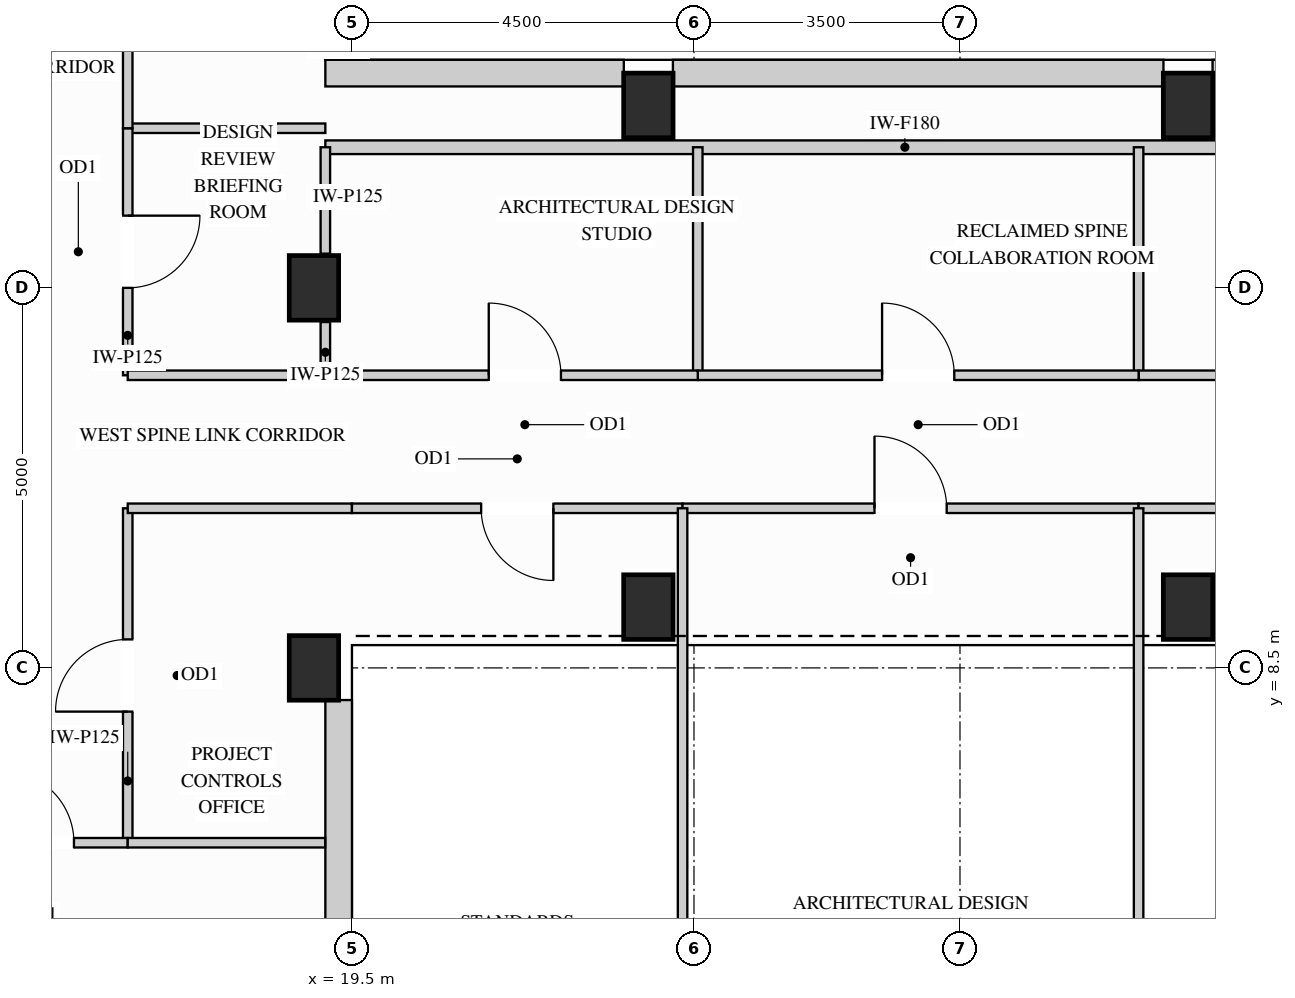
"""IFC4 building model, lengths in metres.
Left out: names, types, materials, properties, quantities, classifications, styles, units other than length and angle.
Written with IfcOpenShell. Run it as: python <this file> out.ifc"""

import sys

from ifc_helpers import new_model, si_unit, direction, frame, frame_2d, origin, origin_2d, place, context, subcontext, project, spatial, rectangle, extrude, source, transform, mapped, element, fill, save


model = new_model("IFC4")
c1 = context("Model", 3, precision=1e-05, world=origin(), true_north=direction((0.0, 1.0)))
c2 = subcontext(c1, "Body", "Model", "MODEL_VIEW")
j1 = project(units=[si_unit("LENGTHUNIT", "METRE"), si_unit("PLANEANGLEUNIT", "RADIAN")], contexts=[c1])
p1 = place(None, origin())
s1 = spatial("IfcSite", under=j1, at=p1, CompositionType="ELEMENT")
p2 = place(p1, origin())
s2 = spatial("IfcBuilding", under=s1, at=p2, CompositionType="ELEMENT")
p3 = place(p2, frame((0.0, 0.0, 241.2)))
s3 = spatial("IfcBuildingStorey", under=s2, at=p3, CompositionType="ELEMENT", Elevation=241.2)
m1 = source(origin(), c2, "Body", "SweptSolid", [
    extrude(rectangle(XDim=0.65, YDim=0.85, at=origin_2d()), origin(), (0.0, 0.0, 1.0), 3.4),
])
for number, where, z_axis, x_axis in (
    (1, (19.0, 13.5, 0.0), (0.0, 0.0, 1.0), (1.0, 0.0, 0.0)),
    (2, (19.0, 8.5, 0.0), (0.0, 0.0, 1.0), (1.0, 0.0, 0.0)),
    (3, (23.4, 15.9, 0.0), (0.0, 0.0, 1.0), (1.0, 0.0, 0.0)),
    (4, (23.4, 9.3, 0.0), (0.0, 0.0, 1.0), (1.0, 0.0, 0.0)),
    (5, (30.5, 15.9, 0.0), (0.0, 0.0, 1.0), (1.0, 0.0, 0.0)),
    (6, (30.5, 9.3, 0.0), (0.0, 0.0, 1.0), (1.0, 0.0, 0.0)),
):
    element("IfcColumn", number, at=place(p3, frame(where, z_axis=z_axis, x_axis=x_axis)), inside=s3, PredefinedType="COLUMN", context=c2, shape_type="MappedRepresentation", body=[
        mapped(m1, transform((0.0, 0.0, 0.0), x_axis=(1.0, 0.0, 0.0), y_axis=(0.0, 1.0, 0.0), z_axis=(0.0, 0.0, 1.0))),
    ])
m2 = source(origin(), c2, "Body", "SweptSolid", [
    extrude(rectangle(XDim=1.079, YDim=0.35, at=frame_2d((0.54, 0.0))), origin(), (0.0, 0.0, 1.0), 2.619),
])
p4 = place(p3, frame((19.325, 16.498, 0.0), z_axis=(0.0, 0.0, 1.0), x_axis=(0.0, 1.0, 0.0)))
e7 = element("IfcWall", 7, at=p4, inside=s3, PredefinedType="SOLIDWALL", context=c2, shape_type="MappedRepresentation", body=[
    mapped(m2, transform((0.0, 0.0, 0.0), x_axis=(1.0, 0.0, 0.0), y_axis=(0.0, 1.0, 0.0), z_axis=(0.0, 0.0, 1.0))),
])
m3 = source(origin(), c2, "Body", "SweptSolid", [
    extrude(rectangle(XDim=4.154, YDim=0.35, at=frame_2d((2.077, 0.0))), origin(), (0.0, 0.0, 1.0), 2.619),
])
p5 = place(p3, frame((19.325, 3.923, 0.0), z_axis=(0.0, 0.0, 1.0), x_axis=(0.0, 1.0, 0.0)))
e8 = element("IfcWall", 8, at=p5, inside=s3, PredefinedType="SOLIDWALL", context=c2, shape_type="MappedRepresentation", body=[
    mapped(m3, transform((0.0, 0.0, 0.0), x_axis=(1.0, 0.0, 0.0), y_axis=(0.0, 1.0, 0.0), z_axis=(0.0, 0.0, 1.0))),
])
m4 = source(origin(), c2, "Body", "SweptSolid", [
    extrude(rectangle(XDim=3.927, YDim=0.35, at=frame_2d((1.963, 0.0))), origin(), (0.0, 0.0, 1.0), 3.385),
])
p6 = place(p3, frame((34.75, 16.325, 0.0), z_axis=(0.0, 0.0, 1.0), x_axis=(-1.0, 0.0, 0.0)))
e9 = element("IfcWall", 9, at=p6, inside=s3, PredefinedType="SOLIDWALL", context=c2, shape_type="MappedRepresentation", body=[
    mapped(m4, transform((0.0, 0.0, 0.0), x_axis=(1.0, 0.0, 0.0), y_axis=(0.0, 1.0, 0.0), z_axis=(0.0, 0.0, 1.0))),
])
m5 = source(origin(), c2, "Body", "SweptSolid", [
    extrude(rectangle(XDim=6.454, YDim=0.35, at=frame_2d((3.227, 0.0))), origin(), (0.0, 0.0, 1.0), 3.385),
])
p7 = place(p3, frame((30.177, 16.325, 0.0), z_axis=(0.0, 0.0, 1.0), x_axis=(-1.0, 0.0, 0.0)))
e10 = element("IfcWall", 10, at=p7, inside=s3, PredefinedType="SOLIDWALL", context=c2, shape_type="MappedRepresentation", body=[
    mapped(m5, transform((0.0, 0.0, 0.0), x_axis=(1.0, 0.0, 0.0), y_axis=(0.0, 1.0, 0.0), z_axis=(0.0, 0.0, 1.0))),
])
p8 = place(p3, frame((23.077, 16.325, 0.0), z_axis=(0.0, 0.0, 1.0), x_axis=(-1.0, 0.0, 0.0)))
e11 = element("IfcWall", 11, at=p8, inside=s3, PredefinedType="SOLIDWALL", context=c2, shape_type="MappedRepresentation", body=[
    mapped(m4, transform((0.0, 0.0, 0.0), x_axis=(1.0, 0.0, 0.0), y_axis=(0.0, 1.0, 0.0), z_axis=(0.0, 0.0, 1.0))),
])
m6 = source(origin(), c2, "Body", "SweptSolid", [
    extrude(rectangle(XDim=15.25, YDim=0.18, at=frame_2d((7.625, 0.0))), origin(), (0.0, 0.0, 1.0), 3.385),
])
p9 = place(p3, frame((19.15, 15.35, 0.0), z_axis=(0.0, 0.0, 1.0), x_axis=(1.0, 0.0, 0.0)))
e12 = element("IfcWall", 12, at=p9, inside=s3, PredefinedType="PARTITIONING", context=c2, shape_type="MappedRepresentation", body=[
    mapped(m6, transform((0.0, 0.0, 0.0), x_axis=(1.0, 0.0, 0.0), y_axis=(0.0, 1.0, 0.0), z_axis=(0.0, 0.0, 1.0))),
])
m7 = source(origin(), c2, "Body", "SweptSolid", [
    extrude(rectangle(XDim=2.6, YDim=0.125, at=frame_2d((1.3, 0.0))), origin(), (0.0, 0.0, 1.0), 3.385),
])
p10 = place(p3, frame((16.55, 15.6, 0.0), z_axis=(0.0, 0.0, 1.0), x_axis=(1.0, 0.0, 0.0)))
e13 = element("IfcWall", 13, at=p10, inside=s3, PredefinedType="PARTITIONING", context=c2, shape_type="MappedRepresentation", body=[
    mapped(m7, transform((0.0, 0.0, 0.0), x_axis=(1.0, 0.0, 0.0), y_axis=(0.0, 1.0, 0.0), z_axis=(0.0, 0.0, 1.0))),
])
m8 = source(origin(), c2, "Body", "SweptSolid", [
    extrude(rectangle(XDim=0.7, YDim=0.125, at=frame_2d((0.35, 0.0))), origin(), (0.0, 0.0, 1.0), 2.773),
])
p11 = place(p3, frame((19.15, 12.35, 0.0), z_axis=(0.0, 0.0, 1.0), x_axis=(0.0, 1.0, 0.0)))
e14 = element("IfcWall", 14, at=p11, inside=s3, PredefinedType="PARTITIONING", context=c2, shape_type="MappedRepresentation", body=[
    mapped(m8, transform((0.0, 0.0, 0.0), x_axis=(1.0, 0.0, 0.0), y_axis=(0.0, 1.0, 0.0), z_axis=(0.0, 0.0, 1.0))),
])
m9 = source(origin(), c2, "Body", "SweptSolid", [
    extrude(rectangle(XDim=1.4, YDim=0.125, at=frame_2d((0.7, 0.0))), origin(), (0.0, 0.0, 1.0), 2.619),
])
p12 = place(p3, frame((19.15, 13.95, 0.0), z_axis=(0.0, 0.0, 1.0), x_axis=(0.0, 1.0, 0.0)))
e15 = element("IfcWall", 15, at=p12, inside=s3, PredefinedType="PARTITIONING", context=c2, shape_type="MappedRepresentation", body=[
    mapped(m9, transform((0.0, 0.0, 0.0), x_axis=(1.0, 0.0, 0.0), y_axis=(0.0, 1.0, 0.0), z_axis=(0.0, 0.0, 1.0))),
])
p13 = place(p3, frame((16.55, 12.35, 0.0), z_axis=(0.0, 0.0, 1.0), x_axis=(0.0, 1.0, 0.0)))
e16 = element("IfcWall", 16, at=p13, inside=s3, PredefinedType="PARTITIONING", context=c2, shape_type="SweptSolid", body=[
    extrude(rectangle(XDim=3.25, YDim=0.125, at=frame_2d((1.625, 0.0))), origin(), (0.0, 0.0, 1.0), 3.385),
])
p14 = place(p13, frame((1.15, 0.0, 0.0)))
e17 = element("IfcOpeningElement", 17, at=p14, cuts=e16, PredefinedType="OPENING", context=c2, shape_type="SweptSolid", body=[
    extrude(rectangle(XDim=0.95, YDim=2.15, at=frame_2d((0.475, 1.075))), frame((0.0, 0.073, 0.0), z_axis=(0.0, -1.0, 0.0), x_axis=(1.0, 0.0, 0.0)), (0.0, 0.0, 1.0), 0.145),
])
p15 = place(p3, frame((16.55, 15.6, 0.0), z_axis=(0.0, 0.0, 1.0), x_axis=(0.0, 1.0, 0.0)))
e18 = element("IfcWall", 18, at=p15, inside=s3, PredefinedType="PARTITIONING", context=c2, shape_type="SweptSolid", body=[
    extrude(rectangle(XDim=7.75, YDim=0.125, at=frame_2d((3.875, 0.0))), origin(), (0.0, 0.0, 1.0), 3.385),
])
p16 = place(p15, frame((3.4, 0.0, 0.0)))
e19 = element("IfcOpeningElement", 19, at=p16, cuts=e18, PredefinedType="OPENING", context=c2, shape_type="SweptSolid", body=[
    extrude(rectangle(XDim=0.95, YDim=2.15, at=frame_2d((0.475, 1.075))), frame((0.0, 0.073, 0.0), z_axis=(0.0, -1.0, 0.0), x_axis=(1.0, 0.0, 0.0)), (0.0, 0.0, 1.0), 0.145),
])
p17 = place(p3, frame((16.55, 6.2, 0.0), z_axis=(0.0, 0.0, 1.0), x_axis=(0.0, 1.0, 0.0)))
e20 = element("IfcWall", 20, at=p17, inside=s3, PredefinedType="PARTITIONING", context=c2, shape_type="SweptSolid", body=[
    extrude(rectangle(XDim=4.4, YDim=0.125, at=frame_2d((2.2, 0.0))), origin(), (0.0, 0.0, 1.0), 3.385),
])
p18 = place(p17, frame((1.725, 0.0, 0.0)))
e21 = element("IfcOpeningElement", 21, at=p18, cuts=e20, PredefinedType="OPENING", context=c2, shape_type="SweptSolid", body=[
    extrude(rectangle(XDim=0.95, YDim=2.15, at=frame_2d((0.475, 1.075))), frame((0.0, 0.073, 0.0), z_axis=(0.0, -1.0, 0.0), x_axis=(1.0, 0.0, 0.0)), (0.0, 0.0, 1.0), 0.145),
])
m10 = source(origin(), c2, "Body", "SweptSolid", [
    extrude(rectangle(XDim=3.0, YDim=0.125, at=frame_2d((1.5, 0.0))), origin(), (0.0, 0.0, 1.0), 3.385),
])
for number, where, z_axis, x_axis in (
    (22, (24.05, 12.35, 0.0), (0.0, 0.0, 1.0), (0.0, 1.0, 0.0)),
    (23, (29.85, 12.35, 0.0), (0.0, 0.0, 1.0), (0.0, 1.0, 0.0)),
):
    element("IfcWall", number, at=place(p3, frame(where, z_axis=z_axis, x_axis=x_axis)), inside=s3, PredefinedType="PARTITIONING", context=c2, shape_type="MappedRepresentation", body=[
        mapped(m10, transform((0.0, 0.0, 0.0), x_axis=(1.0, 0.0, 0.0), y_axis=(0.0, 1.0, 0.0), z_axis=(0.0, 0.0, 1.0))),
    ])
p19 = place(p3, frame((29.85, 12.35, 0.0), z_axis=(0.0, 0.0, 1.0), x_axis=(1.0, 0.0, 0.0)))
e24 = element("IfcWall", 24, at=p19, inside=s3, PredefinedType="PARTITIONING", context=c2, shape_type="SweptSolid", body=[
    extrude(rectangle(XDim=4.55, YDim=0.125, at=frame_2d((2.275, 0.0))), origin(), (0.0, 0.0, 1.0), 3.385),
])
p20 = place(p19, frame((1.8, 0.0, 0.0)))
e25 = element("IfcOpeningElement", 25, at=p20, cuts=e24, PredefinedType="OPENING", context=c2, shape_type="SweptSolid", body=[
    extrude(rectangle(XDim=0.95, YDim=2.15, at=frame_2d((0.475, 1.075))), frame((0.0, 0.073, 0.0), z_axis=(0.0, -1.0, 0.0), x_axis=(1.0, 0.0, 0.0)), (0.0, 0.0, 1.0), 0.145),
])
p21 = place(p3, frame((24.05, 12.35, 0.0), z_axis=(0.0, 0.0, 1.0), x_axis=(1.0, 0.0, 0.0)))
e26 = element("IfcWall", 26, at=p21, inside=s3, PredefinedType="PARTITIONING", context=c2, shape_type="SweptSolid", body=[
    extrude(rectangle(XDim=5.8, YDim=0.125, at=frame_2d((2.9, 0.0))), origin(), (0.0, 0.0, 1.0), 3.385),
])
p22 = place(p21, frame((2.425, 0.0, 0.0)))
e27 = element("IfcOpeningElement", 27, at=p22, cuts=e26, PredefinedType="OPENING", context=c2, shape_type="SweptSolid", body=[
    extrude(rectangle(XDim=0.95, YDim=2.15, at=frame_2d((0.475, 1.075))), frame((0.0, 0.073, 0.0), z_axis=(0.0, -1.0, 0.0), x_axis=(1.0, 0.0, 0.0)), (0.0, 0.0, 1.0), 0.145),
])
m11 = source(origin(), c2, "Body", "SweptSolid", [
    extrude(rectangle(XDim=2.95, YDim=0.125, at=frame_2d((1.475, 0.0))), origin(), (0.0, 0.0, 1.0), 3.385),
])
p23 = place(p3, frame((16.55, 12.35, 0.0), z_axis=(0.0, 0.0, 1.0), x_axis=(1.0, 0.0, 0.0)))
e28 = element("IfcWall", 28, at=p23, inside=s3, PredefinedType="PARTITIONING", context=c2, shape_type="MappedRepresentation", body=[
    mapped(m11, transform((0.0, 0.0, 0.0), x_axis=(1.0, 0.0, 0.0), y_axis=(0.0, 1.0, 0.0), z_axis=(0.0, 0.0, 1.0))),
])
p24 = place(p3, frame((19.5, 12.35, 0.0), z_axis=(0.0, 0.0, 1.0), x_axis=(1.0, 0.0, 0.0)))
e29 = element("IfcWall", 29, at=p24, inside=s3, PredefinedType="PARTITIONING", context=c2, shape_type="SweptSolid", body=[
    extrude(rectangle(XDim=4.55, YDim=0.125, at=frame_2d((2.275, 0.0))), origin(), (0.0, 0.0, 1.0), 3.385),
])
p25 = place(p24, frame((1.8, 0.0, 0.0)))
e30 = element("IfcOpeningElement", 30, at=p25, cuts=e29, PredefinedType="OPENING", context=c2, shape_type="SweptSolid", body=[
    extrude(rectangle(XDim=0.95, YDim=2.15, at=frame_2d((0.475, 1.075))), frame((0.0, 0.073, 0.0), z_axis=(0.0, -1.0, 0.0), x_axis=(1.0, 0.0, 0.0)), (0.0, 0.0, 1.0), 0.145),
])
p26 = place(p3, frame((16.55, 10.6, 0.0), z_axis=(0.0, 0.0, 1.0), x_axis=(1.0, 0.0, 0.0)))
e31 = element("IfcWall", 31, at=p26, inside=s3, PredefinedType="PARTITIONING", context=c2, shape_type="MappedRepresentation", body=[
    mapped(m11, transform((0.0, 0.0, 0.0), x_axis=(1.0, 0.0, 0.0), y_axis=(0.0, 1.0, 0.0), z_axis=(0.0, 0.0, 1.0))),
])
p27 = place(p3, frame((19.5, 10.6, 0.0), z_axis=(0.0, 0.0, 1.0), x_axis=(1.0, 0.0, 0.0)))
e32 = element("IfcWall", 32, at=p27, inside=s3, PredefinedType="PARTITIONING", context=c2, shape_type="SweptSolid", body=[
    extrude(rectangle(XDim=4.35, YDim=0.125, at=frame_2d((2.175, 0.0))), origin(), (0.0, 0.0, 1.0), 3.385),
])
p28 = place(p27, frame((1.7, 0.0, 0.0)))
e33 = element("IfcOpeningElement", 33, at=p28, cuts=e32, PredefinedType="OPENING", context=c2, shape_type="SweptSolid", body=[
    extrude(rectangle(XDim=0.95, YDim=2.15, at=frame_2d((0.475, 1.075))), frame((0.0, 0.073, 0.0), z_axis=(0.0, -1.0, 0.0), x_axis=(1.0, 0.0, 0.0)), (0.0, 0.0, 1.0), 0.145),
])
p29 = place(p3, frame((23.85, 10.6, 0.0), z_axis=(0.0, 0.0, 1.0), x_axis=(1.0, 0.0, 0.0)))
e34 = element("IfcWall", 34, at=p29, inside=s3, PredefinedType="PARTITIONING", context=c2, shape_type="SweptSolid", body=[
    extrude(rectangle(XDim=6.0, YDim=0.125, at=frame_2d((3.0, 0.0))), origin(), (0.0, 0.0, 1.0), 3.385),
])
p30 = place(p29, frame((2.525, 0.0, 0.0)))
e35 = element("IfcOpeningElement", 35, at=p30, cuts=e34, PredefinedType="OPENING", context=c2, shape_type="SweptSolid", body=[
    extrude(rectangle(XDim=0.95, YDim=2.15, at=frame_2d((0.475, 1.075))), frame((0.0, 0.073, 0.0), z_axis=(0.0, -1.0, 0.0), x_axis=(1.0, 0.0, 0.0)), (0.0, 0.0, 1.0), 0.145),
])
p31 = place(p3, frame((29.85, 10.6, 0.0), z_axis=(0.0, 0.0, 1.0), x_axis=(1.0, 0.0, 0.0)))
e36 = element("IfcWall", 36, at=p31, inside=s3, PredefinedType="PARTITIONING", context=c2, shape_type="SweptSolid", body=[
    extrude(rectangle(XDim=4.55, YDim=0.125, at=frame_2d((2.275, 0.0))), origin(), (0.0, 0.0, 1.0), 3.385),
])
p32 = place(p31, frame((1.8, 0.0, 0.0)))
e37 = element("IfcOpeningElement", 37, at=p32, cuts=e36, PredefinedType="OPENING", context=c2, shape_type="SweptSolid", body=[
    extrude(rectangle(XDim=0.95, YDim=2.15, at=frame_2d((0.475, 1.075))), frame((0.0, 0.073, 0.0), z_axis=(0.0, -1.0, 0.0), x_axis=(1.0, 0.0, 0.0)), (0.0, 0.0, 1.0), 0.145),
])
m12 = source(origin(), c2, "Body", "SweptSolid", [
    extrude(rectangle(XDim=10.25, YDim=0.125, at=frame_2d((5.125, 0.0))), origin(), (0.0, 0.0, 1.0), 3.385),
])
for number, where, z_axis, x_axis in (
    (38, (23.85, 0.35, 0.0), (0.0, 0.0, 1.0), (0.0, 1.0, 0.0)),
    (39, (29.85, 0.35, 0.0), (0.0, 0.0, 1.0), (0.0, 1.0, 0.0)),
):
    element("IfcWall", number, at=place(p3, frame(where, z_axis=z_axis, x_axis=x_axis)), inside=s3, PredefinedType="PARTITIONING", context=c2, shape_type="MappedRepresentation", body=[
        mapped(m12, transform((0.0, 0.0, 0.0), x_axis=(1.0, 0.0, 0.0), y_axis=(0.0, 1.0, 0.0), z_axis=(0.0, 0.0, 1.0))),
    ])
p33 = place(p3, frame((14.185, 6.2, 0.0), z_axis=(0.0, 0.0, 1.0), x_axis=(1.0, 0.0, 0.0)))
e40 = element("IfcWall", 40, at=p33, inside=s3, PredefinedType="PARTITIONING", context=c2, shape_type="SweptSolid", body=[
    extrude(rectangle(XDim=2.365, YDim=0.125, at=frame_2d((1.183, 0.0))), origin(), (0.0, 0.0, 1.0), 2.848),
])
p34 = place(p33, frame((0.708, 0.0, 0.0)))
e41 = element("IfcOpeningElement", 41, at=p34, cuts=e40, PredefinedType="OPENING", context=c2, shape_type="SweptSolid", body=[
    extrude(rectangle(XDim=0.95, YDim=2.15, at=frame_2d((0.475, 1.075))), frame((0.0, 0.073, 0.0), z_axis=(0.0, -1.0, 0.0), x_axis=(1.0, 0.0, 0.0)), (0.0, 0.0, 1.0), 0.145),
])
m13 = source(origin(), c2, "Body", "SweptSolid", [
    extrude(rectangle(XDim=2.598, YDim=0.125, at=frame_2d((1.299, 0.0))), origin(), (0.0, 0.0, 1.0), 2.848),
])
p35 = place(p3, frame((16.55, 6.2, 0.0), z_axis=(0.0, 0.0, 1.0), x_axis=(1.0, 0.0, 0.0)))
e42 = element("IfcWall", 42, at=p35, inside=s3, PredefinedType="PARTITIONING", context=c2, shape_type="MappedRepresentation", body=[
    mapped(m13, transform((0.0, 0.0, 0.0), x_axis=(1.0, 0.0, 0.0), y_axis=(0.0, 1.0, 0.0), z_axis=(0.0, 0.0, 1.0))),
])
m14 = source(origin(), c2, "Body", "SweptSolid", [
    extrude(rectangle(XDim=0.95, YDim=2.15, at=frame_2d((0.475, 1.075))), frame((0.0, 0.025, 0.0), z_axis=(0.0, -1.0, 0.0), x_axis=(1.0, 0.0, 0.0)), (0.0, 0.0, 1.0), 0.05),
])
p36 = place(p18, origin())
e43 = element("IfcDoor", 43, at=p36, inside=s3, OperationType="SINGLE_SWING_LEFT", PredefinedType="DOOR", context=c2, shape_type="MappedRepresentation", body=[
    mapped(m14, transform((0.0, 0.0, 0.0), x_axis=(1.0, 0.0, 0.0), y_axis=(0.0, 1.0, 0.0), z_axis=(0.0, 0.0, 1.0))),
])
fill(e21, e43)
p37 = place(p14, origin())
e44 = element("IfcDoor", 44, at=p37, inside=s3, OperationType="SINGLE_SWING_RIGHT", PredefinedType="DOOR", context=c2, shape_type="MappedRepresentation", body=[
    mapped(m14, transform((0.0, 0.0, 0.0), x_axis=(1.0, 0.0, 0.0), y_axis=(0.0, 1.0, 0.0), z_axis=(0.0, 0.0, 1.0))),
])
fill(e17, e44)
p38 = place(p34, origin())
e45 = element("IfcDoor", 45, at=p38, inside=s3, OperationType="SINGLE_SWING_LEFT", PredefinedType="DOOR", context=c2, shape_type="MappedRepresentation", body=[
    mapped(m14, transform((0.0, 0.0, 0.0), x_axis=(1.0, 0.0, 0.0), y_axis=(0.0, 1.0, 0.0), z_axis=(0.0, 0.0, 1.0))),
])
fill(e41, e45)
p39 = place(p22, origin())
e46 = element("IfcDoor", 46, at=p39, inside=s3, OperationType="SINGLE_SWING_LEFT", PredefinedType="DOOR", context=c2, shape_type="MappedRepresentation", body=[
    mapped(m14, transform((0.0, 0.0, 0.0), x_axis=(1.0, 0.0, 0.0), y_axis=(0.0, 1.0, 0.0), z_axis=(0.0, 0.0, 1.0))),
])
fill(e27, e46)
p40 = place(p25, origin())
e47 = element("IfcDoor", 47, at=p40, inside=s3, OperationType="SINGLE_SWING_LEFT", PredefinedType="DOOR", context=c2, shape_type="MappedRepresentation", body=[
    mapped(m14, transform((0.0, 0.0, 0.0), x_axis=(1.0, 0.0, 0.0), y_axis=(0.0, 1.0, 0.0), z_axis=(0.0, 0.0, 1.0))),
])
fill(e30, e47)
p41 = place(p28, origin())
e48 = element("IfcDoor", 48, at=p41, inside=s3, OperationType="SINGLE_SWING_RIGHT", PredefinedType="DOOR", context=c2, shape_type="MappedRepresentation", body=[
    mapped(m14, transform((0.0, 0.0, 0.0), x_axis=(1.0, 0.0, 0.0), y_axis=(0.0, 1.0, 0.0), z_axis=(0.0, 0.0, 1.0))),
])
fill(e33, e48)
p42 = place(p30, origin())
e49 = element("IfcDoor", 49, at=p42, inside=s3, OperationType="SINGLE_SWING_LEFT", PredefinedType="DOOR", context=c2, shape_type="MappedRepresentation", body=[
    mapped(m14, transform((0.0, 0.0, 0.0), x_axis=(1.0, 0.0, 0.0), y_axis=(0.0, 1.0, 0.0), z_axis=(0.0, 0.0, 1.0))),
])
fill(e35, e49)
save(model, sys.argv[1])
